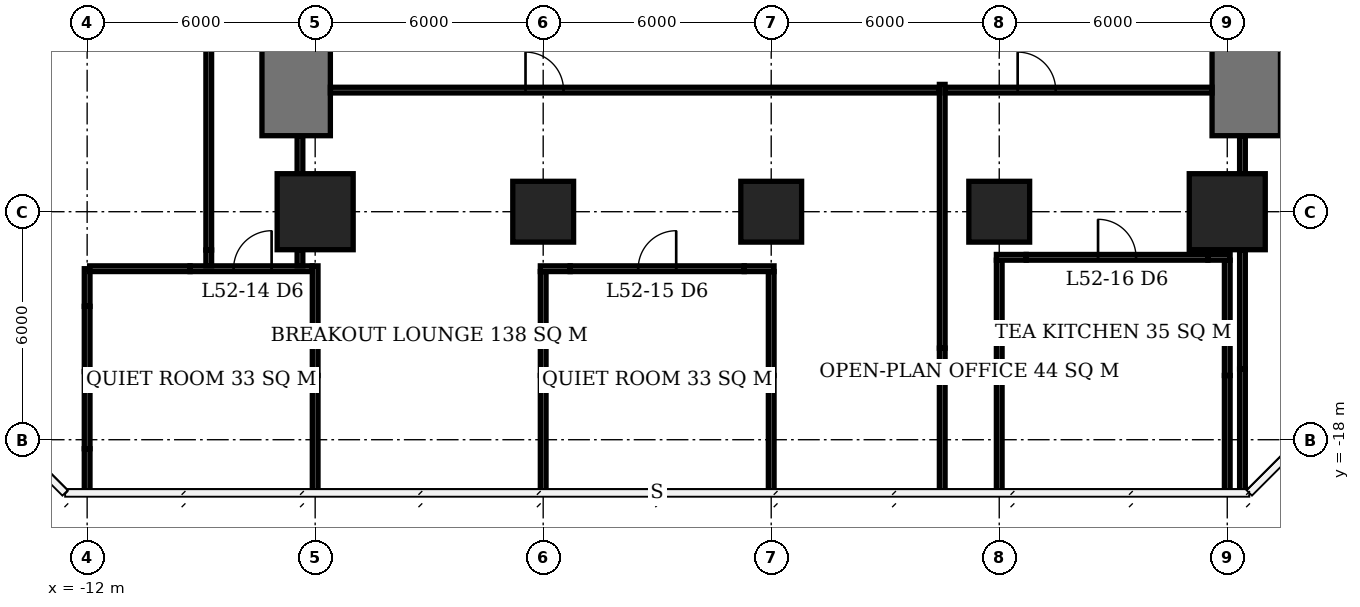
"""IFC4 building model, lengths in metres.
Left out: names, types, materials, properties, quantities, classifications, styles, units other than length and angle.
Written with IfcOpenShell. Run it as: python <this file> out.ifc"""

import sys

from ifc_helpers import new_model, si_unit, direction, frame, frame_2d, origin, origin_2d, place, context, subcontext, project, spatial, rectangle, extrude, element, fill, save


model = new_model("IFC4")
c1 = context("Model", 3, precision=1e-05, world=origin(), true_north=direction((0.0, 1.0)))
c2 = subcontext(c1, "Body", "Model", "MODEL_VIEW")
j1 = project(units=[si_unit("LENGTHUNIT", "METRE"), si_unit("PLANEANGLEUNIT", "RADIAN")], contexts=[c1])
p1 = place(None, origin())
s1 = spatial("IfcSite", under=j1, at=p1, CompositionType="ELEMENT")
p2 = place(p1, origin())
s2 = spatial("IfcBuilding", under=s1, at=p2, CompositionType="ELEMENT")
p3 = place(p2, frame((0.0, 0.0, 212.3)))
s3 = spatial("IfcBuildingStorey", under=s2, at=p3, CompositionType="ELEMENT", Elevation=212.3)
p4 = place(p3, frame((-6.0, -12.0, 0.0), z_axis=(0.0, 0.0, 1.0), x_axis=(1.0, 0.0, 0.0)))
e1 = element("IfcColumn", 1, at=p4, inside=s3, PredefinedType="COLUMN", context=c2, shape_type="SweptSolid", body=[
    extrude(rectangle(XDim=2.0, YDim=2.0, at=origin_2d()), origin(), (0.0, 0.0, 1.0), 3.9),
])
for number, where, z_axis, x_axis in (
    (2, (0.0, -12.0, 0.0), (0.0, 0.0, 1.0), (1.0, 0.0, 0.0)),
    (3, (6.0, -12.0, 0.0), (0.0, 0.0, 1.0), (1.0, 0.0, 0.0)),
    (4, (12.0, -12.0, 0.0), (0.0, 0.0, 1.0), (1.0, 0.0, 0.0)),
):
    element("IfcColumn", number, at=place(p3, frame(where, z_axis=z_axis, x_axis=x_axis)), inside=s3, PredefinedType="COLUMN", context=c2, shape_type="SweptSolid", body=[
        extrude(rectangle(XDim=1.6, YDim=1.6, at=origin_2d()), origin(), (0.0, 0.0, 1.0), 3.9),
    ])
p5 = place(p3, frame((18.0, -12.0, 0.0), z_axis=(0.0, 0.0, 1.0), x_axis=(1.0, 0.0, 0.0)))
e5 = element("IfcColumn", 5, at=p5, inside=s3, PredefinedType="COLUMN", context=c2, shape_type="SweptSolid", body=[
    extrude(rectangle(XDim=2.0, YDim=2.0, at=origin_2d()), origin(), (0.0, 0.0, 1.0), 3.9),
])
for number, where, z_axis, x_axis in (
    (6, (-6.5, -10.0, 0.0), (0.0, 0.0, 1.0), (0.0, 1.0, 0.0)),
    (7, (18.5, -10.0, 0.0), (0.0, 0.0, 1.0), (0.0, 1.0, 0.0)),
):
    element("IfcWall", number, at=place(p3, frame(where, z_axis=z_axis, x_axis=x_axis)), inside=s3, PredefinedType="SHEAR", context=c2, shape_type="SweptSolid", body=[
        extrude(rectangle(XDim=2.4, YDim=1.8, at=frame_2d((1.2, 0.0))), origin(), (0.0, 0.0, 1.0), 3.9),
    ])
p6 = place(p3, frame((-11.935, -13.5, 0.0), z_axis=(0.0, 0.0, 1.0), x_axis=(1.0, 0.0, 0.0)))
e8 = element("IfcWall", 8, at=p6, inside=s3, PredefinedType="PARTITIONING", context=c2, shape_type="SweptSolid", body=[
    extrude(rectangle(XDim=2.643, YDim=0.15, at=frame_2d((1.322, 0.0))), origin(), (0.0, 0.0, 1.0), 3.65),
])
p7 = place(p3, frame((-9.292, -13.5, 0.0), z_axis=(0.0, 0.0, 1.0), x_axis=(1.0, 0.0, 0.0)))
e9 = element("IfcWall", 9, at=p7, inside=s3, PredefinedType="PARTITIONING", context=c2, shape_type="SweptSolid", body=[
    extrude(rectangle(XDim=3.217, YDim=0.15, at=frame_2d((1.608, 0.0))), origin(), (0.0, 0.0, 1.0), 2.65),
])
p8 = place(p7, frame((1.146, 0.0, 0.0)))
e10 = element("IfcOpeningElement", 10, at=p8, cuts=e9, PredefinedType="OPENING", context=c2, shape_type="SweptSolid", body=[
    extrude(rectangle(XDim=1.0, YDim=2.1, at=frame_2d((0.5, 1.05))), frame((0.0, 0.085, 0.0), z_axis=(0.0, -1.0, 0.0), x_axis=(1.0, 0.0, 0.0)), (0.0, 0.0, 1.0), 0.17),
])
p9 = place(p3, frame((-0.075, -13.5, 0.0), z_axis=(0.0, 0.0, 1.0), x_axis=(1.0, 0.0, 0.0)))
e11 = element("IfcWall", 11, at=p9, inside=s3, PredefinedType="PARTITIONING", context=c2, shape_type="SweptSolid", body=[
    extrude(rectangle(XDim=0.785, YDim=0.15, at=frame_2d((0.393, 0.0))), origin(), (0.0, 0.0, 1.0), 2.65),
])
p10 = place(p3, frame((0.71, -13.5, 0.0), z_axis=(0.0, 0.0, 1.0), x_axis=(1.0, 0.0, 0.0)))
e12 = element("IfcWall", 12, at=p10, inside=s3, PredefinedType="PARTITIONING", context=c2, shape_type="SweptSolid", body=[
    extrude(rectangle(XDim=4.58, YDim=0.15, at=frame_2d((2.29, 0.0))), origin(), (0.0, 0.0, 1.0), 3.65),
])
p11 = place(p10, frame((1.79, 0.0, 0.0)))
e13 = element("IfcOpeningElement", 13, at=p11, cuts=e12, PredefinedType="OPENING", context=c2, shape_type="SweptSolid", body=[
    extrude(rectangle(XDim=1.0, YDim=2.1, at=frame_2d((0.5, 1.05))), frame((0.0, 0.085, 0.0), z_axis=(0.0, -1.0, 0.0), x_axis=(1.0, 0.0, 0.0)), (0.0, 0.0, 1.0), 0.17),
])
for number, where, z_axis, x_axis in (
    (14, (5.29, -13.5, 0.0), (0.0, 0.0, 1.0), (1.0, 0.0, 0.0)),
    (15, (11.925, -13.2, 0.0), (0.0, 0.0, 1.0), (1.0, 0.0, 0.0)),
):
    element("IfcWall", number, at=place(p3, frame(where, z_axis=z_axis, x_axis=x_axis)), inside=s3, PredefinedType="PARTITIONING", context=c2, shape_type="SweptSolid", body=[
        extrude(rectangle(XDim=0.785, YDim=0.15, at=frame_2d((0.393, 0.0))), origin(), (0.0, 0.0, 1.0), 2.65),
    ])
p12 = place(p3, frame((12.71, -13.2, 0.0), z_axis=(0.0, 0.0, 1.0), x_axis=(1.0, 0.0, 0.0)))
e16 = element("IfcWall", 16, at=p12, inside=s3, PredefinedType="PARTITIONING", context=c2, shape_type="SweptSolid", body=[
    extrude(rectangle(XDim=4.78, YDim=0.15, at=frame_2d((2.39, 0.0))), origin(), (0.0, 0.0, 1.0), 3.65),
])
p13 = place(p12, frame((1.89, 0.0, 0.0)))
e17 = element("IfcOpeningElement", 17, at=p13, cuts=e16, PredefinedType="OPENING", context=c2, shape_type="SweptSolid", body=[
    extrude(rectangle(XDim=1.0, YDim=2.1, at=frame_2d((0.5, 1.05))), frame((0.0, 0.085, 0.0), z_axis=(0.0, -1.0, 0.0), x_axis=(1.0, 0.0, 0.0)), (0.0, 0.0, 1.0), 0.17),
])
p14 = place(p3, frame((17.49, -13.2, 0.0), z_axis=(0.0, 0.0, 1.0), x_axis=(1.0, 0.0, 0.0)))
e18 = element("IfcWall", 18, at=p14, inside=s3, PredefinedType="PARTITIONING", context=c2, shape_type="SweptSolid", body=[
    extrude(rectangle(XDim=0.585, YDim=0.15, at=frame_2d((0.292, 0.0))), origin(), (0.0, 0.0, 1.0), 2.65),
])
p15 = place(p3, frame((-12.0, -19.4, 0.0), z_axis=(0.0, 0.0, 1.0), x_axis=(0.0, 1.0, 0.0)))
e19 = element("IfcWall", 19, at=p15, inside=s3, PredefinedType="PARTITIONING", context=c2, shape_type="SweptSolid", body=[
    extrude(rectangle(XDim=1.163, YDim=0.15, at=frame_2d((0.582, 0.0))), origin(), (0.0, 0.0, 1.0), 3.65),
])
p16 = place(p3, frame((-12.0, -18.237, 0.0), z_axis=(0.0, 0.0, 1.0), x_axis=(0.0, 1.0, 0.0)))
e20 = element("IfcWall", 20, at=p16, inside=s3, PredefinedType="PARTITIONING", context=c2, shape_type="SweptSolid", body=[
    extrude(rectangle(XDim=2.029, YDim=0.15, at=frame_2d((1.015, 0.0))), origin(), (0.0, 0.0, 1.0), 2.65),
])
p17 = place(p3, frame((-12.0, -16.208, 0.0), z_axis=(0.0, 0.0, 1.0), x_axis=(0.0, 1.0, 0.0)))
e21 = element("IfcWall", 21, at=p17, inside=s3, PredefinedType="PARTITIONING", context=c2, shape_type="SweptSolid", body=[
    extrude(rectangle(XDim=1.718, YDim=0.15, at=frame_2d((0.859, 0.0))), origin(), (0.0, 0.0, 1.0), 3.65),
])
p18 = place(p3, frame((-12.0, -14.49, 0.0), z_axis=(0.0, 0.0, 1.0), x_axis=(0.0, 1.0, 0.0)))
e22 = element("IfcWall", 22, at=p18, inside=s3, PredefinedType="PARTITIONING", context=c2, shape_type="SweptSolid", body=[
    extrude(rectangle(XDim=0.99, YDim=0.15, at=frame_2d((0.495, 0.0))), origin(), (0.0, 0.0, 1.0), 2.65),
])
p19 = place(p3, frame((-6.0, -19.4, 0.0), z_axis=(0.0, 0.0, 1.0), x_axis=(0.0, 1.0, 0.0)))
e23 = element("IfcWall", 23, at=p19, inside=s3, PredefinedType="PARTITIONING", context=c2, shape_type="SweptSolid", body=[
    extrude(rectangle(XDim=3.09, YDim=0.15, at=frame_2d((1.545, 0.0))), origin(), (0.0, 0.0, 1.0), 3.65),
])
p20 = place(p3, frame((-6.0, -16.31, 0.0), z_axis=(0.0, 0.0, 1.0), x_axis=(0.0, 1.0, 0.0)))
e24 = element("IfcWall", 24, at=p20, inside=s3, PredefinedType="PARTITIONING", context=c2, shape_type="SweptSolid", body=[
    extrude(rectangle(XDim=2.885, YDim=0.15, at=frame_2d((1.442, 0.0))), origin(), (0.0, 0.0, 1.0), 2.65),
])
p21 = place(p3, frame((0.0, -19.35, 0.0), z_axis=(0.0, 0.0, 1.0), x_axis=(0.0, 1.0, 0.0)))
e25 = element("IfcWall", 25, at=p21, inside=s3, PredefinedType="PARTITIONING", context=c2, shape_type="SweptSolid", body=[
    extrude(rectangle(XDim=3.04, YDim=0.15, at=frame_2d((1.52, 0.0))), origin(), (0.0, 0.0, 1.0), 3.65),
])
p22 = place(p3, frame((0.0, -16.31, 0.0), z_axis=(0.0, 0.0, 1.0), x_axis=(0.0, 1.0, 0.0)))
e26 = element("IfcWall", 26, at=p22, inside=s3, PredefinedType="PARTITIONING", context=c2, shape_type="SweptSolid", body=[
    extrude(rectangle(XDim=2.735, YDim=0.15, at=frame_2d((1.368, 0.0))), origin(), (0.0, 0.0, 1.0), 2.65),
])
p23 = place(p3, frame((6.0, -19.35, 0.0), z_axis=(0.0, 0.0, 1.0), x_axis=(0.0, 1.0, 0.0)))
e27 = element("IfcWall", 27, at=p23, inside=s3, PredefinedType="PARTITIONING", context=c2, shape_type="SweptSolid", body=[
    extrude(rectangle(XDim=3.04, YDim=0.15, at=frame_2d((1.52, 0.0))), origin(), (0.0, 0.0, 1.0), 3.65),
])
p24 = place(p3, frame((6.0, -16.31, 0.0), z_axis=(0.0, 0.0, 1.0), x_axis=(0.0, 1.0, 0.0)))
e28 = element("IfcWall", 28, at=p24, inside=s3, PredefinedType="PARTITIONING", context=c2, shape_type="SweptSolid", body=[
    extrude(rectangle(XDim=2.735, YDim=0.15, at=frame_2d((1.368, 0.0))), origin(), (0.0, 0.0, 1.0), 2.65),
])
p25 = place(p3, frame((12.0, -19.4, 0.0), z_axis=(0.0, 0.0, 1.0), x_axis=(0.0, 1.0, 0.0)))
e29 = element("IfcWall", 29, at=p25, inside=s3, PredefinedType="PARTITIONING", context=c2, shape_type="SweptSolid", body=[
    extrude(rectangle(XDim=3.09, YDim=0.15, at=frame_2d((1.545, 0.0))), origin(), (0.0, 0.0, 1.0), 3.65),
])
p26 = place(p3, frame((12.0, -16.31, 0.0), z_axis=(0.0, 0.0, 1.0), x_axis=(0.0, 1.0, 0.0)))
e30 = element("IfcWall", 30, at=p26, inside=s3, PredefinedType="PARTITIONING", context=c2, shape_type="SweptSolid", body=[
    extrude(rectangle(XDim=3.035, YDim=0.15, at=frame_2d((1.518, 0.0))), origin(), (0.0, 0.0, 1.0), 2.65),
])
p27 = place(p3, frame((18.0, -19.4, 0.0), z_axis=(0.0, 0.0, 1.0), x_axis=(0.0, 1.0, 0.0)))
e31 = element("IfcWall", 31, at=p27, inside=s3, PredefinedType="PARTITIONING", context=c2, shape_type="SweptSolid", body=[
    extrude(rectangle(XDim=3.09, YDim=0.15, at=frame_2d((1.545, 0.0))), origin(), (0.0, 0.0, 1.0), 3.65),
])
p28 = place(p3, frame((18.0, -16.31, 0.0), z_axis=(0.0, 0.0, 1.0), x_axis=(0.0, 1.0, 0.0)))
e32 = element("IfcWall", 32, at=p28, inside=s3, PredefinedType="PARTITIONING", context=c2, shape_type="SweptSolid", body=[
    extrude(rectangle(XDim=3.035, YDim=0.15, at=frame_2d((1.518, 0.0))), origin(), (0.0, 0.0, 1.0), 2.65),
])
p29 = place(p3, frame((-8.8, -13.425, 0.0), z_axis=(0.0, 0.0, 1.0), x_axis=(0.0, 1.0, 0.0)))
e33 = element("IfcWall", 33, at=p29, inside=s3, PredefinedType="PARTITIONING", context=c2, shape_type="SweptSolid", body=[
    extrude(rectangle(XDim=0.417, YDim=0.15, at=frame_2d((0.208, 0.0))), origin(), (0.0, 0.0, 1.0), 2.65),
])
p30 = place(p3, frame((-8.8, -13.008, 0.0), z_axis=(0.0, 0.0, 1.0), x_axis=(0.0, 1.0, 0.0)))
e34 = element("IfcWall", 34, at=p30, inside=s3, PredefinedType="PARTITIONING", context=c2, shape_type="SweptSolid", body=[
    extrude(rectangle(XDim=20.433, YDim=0.15, at=frame_2d((10.216, 0.0))), origin(), (0.0, 0.0, 1.0), 3.65),
])
p31 = place(p30, frame((6.407, 0.0, 0.0)))
e35 = element("IfcOpeningElement", 35, at=p31, cuts=e34, PredefinedType="OPENING", context=c2, shape_type="SweptSolid", body=[
    extrude(rectangle(XDim=1.0, YDim=2.1, at=frame_2d((0.5, 1.05))), frame((0.0, 0.085, 0.0), z_axis=(0.0, -1.0, 0.0), x_axis=(1.0, 0.0, 0.0)), (0.0, 0.0, 1.0), 0.17),
])
p32 = place(p3, frame((-6.4, -13.425, 0.0), z_axis=(0.0, 0.0, 1.0), x_axis=(0.0, 1.0, 0.0)))
e36 = element("IfcWall", 36, at=p32, inside=s3, PredefinedType="PARTITIONING", context=c2, shape_type="SweptSolid", body=[
    extrude(rectangle(XDim=0.425, YDim=0.15, at=frame_2d((0.212, 0.0))), origin(), (0.0, 0.0, 1.0), 2.65),
])
p33 = place(p3, frame((-6.4, -11.0, 0.0), z_axis=(0.0, 0.0, 1.0), x_axis=(0.0, 1.0, 0.0)))
e37 = element("IfcWall", 37, at=p33, inside=s3, PredefinedType="PARTITIONING", context=c2, shape_type="SweptSolid", body=[
    extrude(rectangle(XDim=1.0, YDim=0.15, at=frame_2d((0.5, 0.0))), origin(), (0.0, 0.0, 1.0), 3.65),
])
p34 = place(p3, frame((-5.6, -8.8, 0.0), z_axis=(0.0, 0.0, 1.0), x_axis=(1.0, 0.0, 0.0)))
e38 = element("IfcWall", 38, at=p34, inside=s3, PredefinedType="PARTITIONING", context=c2, shape_type="SweptSolid", body=[
    extrude(rectangle(XDim=16.025, YDim=0.15, at=frame_2d((8.013, 0.0))), origin(), (0.0, 0.0, 1.0), 3.65),
])
p35 = place(p34, frame((5.135, 0.0, 0.0)))
e39 = element("IfcOpeningElement", 39, at=p35, cuts=e38, PredefinedType="OPENING", context=c2, shape_type="SweptSolid", body=[
    extrude(rectangle(XDim=1.0, YDim=2.1, at=frame_2d((0.5, 1.05))), frame((0.0, 0.085, 0.0), z_axis=(0.0, -1.0, 0.0), x_axis=(1.0, 0.0, 0.0)), (0.0, 0.0, 1.0), 0.17),
])
p36 = place(p3, frame((10.5, -19.4, 0.0), z_axis=(0.0, 0.0, 1.0), x_axis=(0.0, 1.0, 0.0)))
e40 = element("IfcWall", 40, at=p36, inside=s3, PredefinedType="PARTITIONING", context=c2, shape_type="SweptSolid", body=[
    extrude(rectangle(XDim=3.09, YDim=0.15, at=frame_2d((1.545, 0.0))), origin(), (0.0, 0.0, 1.0), 3.65),
])
p37 = place(p3, frame((10.5, -16.31, 0.0), z_axis=(0.0, 0.0, 1.0), x_axis=(0.0, 1.0, 0.0)))
e41 = element("IfcWall", 41, at=p37, inside=s3, PredefinedType="PARTITIONING", context=c2, shape_type="SweptSolid", body=[
    extrude(rectangle(XDim=0.72, YDim=0.15, at=frame_2d((0.36, 0.0))), origin(), (0.0, 0.0, 1.0), 2.65),
])
p38 = place(p3, frame((10.5, -15.59, 0.0), z_axis=(0.0, 0.0, 1.0), x_axis=(0.0, 1.0, 0.0)))
e42 = element("IfcWall", 42, at=p38, inside=s3, PredefinedType="PARTITIONING", context=c2, shape_type="SweptSolid", body=[
    extrude(rectangle(XDim=6.94, YDim=0.15, at=frame_2d((3.47, 0.0))), origin(), (0.0, 0.0, 1.0), 3.65),
])
p39 = place(p3, frame((10.575, -8.8, 0.0), z_axis=(0.0, 0.0, 1.0), x_axis=(1.0, 0.0, 0.0)))
e43 = element("IfcWall", 43, at=p39, inside=s3, PredefinedType="PARTITIONING", context=c2, shape_type="SweptSolid", body=[
    extrude(rectangle(XDim=7.025, YDim=0.15, at=frame_2d((3.513, 0.0))), origin(), (0.0, 0.0, 1.0), 3.65),
])
p40 = place(p39, frame((1.91, 0.0, 0.0)))
e44 = element("IfcOpeningElement", 44, at=p40, cuts=e43, PredefinedType="OPENING", context=c2, shape_type="SweptSolid", body=[
    extrude(rectangle(XDim=1.0, YDim=2.1, at=frame_2d((0.5, 1.05))), frame((0.0, 0.085, 0.0), z_axis=(0.0, -1.0, 0.0), x_axis=(1.0, 0.0, 0.0)), (0.0, 0.0, 1.0), 0.17),
])
p41 = place(p3, frame((18.4, -19.4, 0.0), z_axis=(0.0, 0.0, 1.0), x_axis=(0.0, 1.0, 0.0)))
e45 = element("IfcWall", 45, at=p41, inside=s3, PredefinedType="PARTITIONING", context=c2, shape_type="SweptSolid", body=[
    extrude(rectangle(XDim=3.26, YDim=0.15, at=frame_2d((1.63, 0.0))), origin(), (0.0, 0.0, 1.0), 3.65),
])
p42 = place(p3, frame((18.4, -16.14, 0.0), z_axis=(0.0, 0.0, 1.0), x_axis=(0.0, 1.0, 0.0)))
e46 = element("IfcWall", 46, at=p42, inside=s3, PredefinedType="PARTITIONING", context=c2, shape_type="SweptSolid", body=[
    extrude(rectangle(XDim=3.14, YDim=0.15, at=frame_2d((1.57, 0.0))), origin(), (0.0, 0.0, 1.0), 2.65),
])
p43 = place(p3, frame((18.4, -11.0, 0.0), z_axis=(0.0, 0.0, 1.0), x_axis=(0.0, 1.0, 0.0)))
e47 = element("IfcWall", 47, at=p43, inside=s3, PredefinedType="PARTITIONING", context=c2, shape_type="SweptSolid", body=[
    extrude(rectangle(XDim=1.0, YDim=0.15, at=frame_2d((0.5, 0.0))), origin(), (0.0, 0.0, 1.0), 3.65),
])
p44 = place(p8, origin())
e48 = element("IfcDoor", 48, at=p44, inside=s3, OperationType="SINGLE_SWING_RIGHT", PredefinedType="DOOR", context=c2, shape_type="SweptSolid", body=[
    extrude(rectangle(XDim=1.0, YDim=2.1, at=frame_2d((0.5, 1.05))), frame((0.0, 0.025, 0.0), z_axis=(0.0, -1.0, 0.0), x_axis=(1.0, 0.0, 0.0)), (0.0, 0.0, 1.0), 0.05),
])
fill(e10, e48)
p45 = place(p11, origin())
e49 = element("IfcDoor", 49, at=p45, inside=s3, OperationType="SINGLE_SWING_RIGHT", PredefinedType="DOOR", context=c2, shape_type="SweptSolid", body=[
    extrude(rectangle(XDim=1.0, YDim=2.1, at=frame_2d((0.5, 1.05))), frame((0.0, 0.025, 0.0), z_axis=(0.0, -1.0, 0.0), x_axis=(1.0, 0.0, 0.0)), (0.0, 0.0, 1.0), 0.05),
])
fill(e13, e49)
p46 = place(p13, origin())
e50 = element("IfcDoor", 50, at=p46, inside=s3, OperationType="SINGLE_SWING_LEFT", PredefinedType="DOOR", context=c2, shape_type="SweptSolid", body=[
    extrude(rectangle(XDim=1.0, YDim=2.1, at=frame_2d((0.5, 1.05))), frame((0.0, 0.025, 0.0), z_axis=(0.0, -1.0, 0.0), x_axis=(1.0, 0.0, 0.0)), (0.0, 0.0, 1.0), 0.05),
])
fill(e17, e50)
p47 = place(p35, origin())
e51 = element("IfcDoor", 51, at=p47, inside=s3, OperationType="SINGLE_SWING_LEFT", PredefinedType="DOOR", context=c2, shape_type="SweptSolid", body=[
    extrude(rectangle(XDim=1.0, YDim=2.1, at=frame_2d((0.5, 1.05))), frame((0.0, 0.025, 0.0), z_axis=(0.0, -1.0, 0.0), x_axis=(1.0, 0.0, 0.0)), (0.0, 0.0, 1.0), 0.05),
])
fill(e39, e51)
p48 = place(p40, origin())
e52 = element("IfcDoor", 52, at=p48, inside=s3, OperationType="SINGLE_SWING_LEFT", PredefinedType="DOOR", context=c2, shape_type="SweptSolid", body=[
    extrude(rectangle(XDim=1.0, YDim=2.1, at=frame_2d((0.5, 1.05))), frame((0.0, 0.025, 0.0), z_axis=(0.0, -1.0, 0.0), x_axis=(1.0, 0.0, 0.0)), (0.0, 0.0, 1.0), 0.05),
])
fill(e44, e52)
save(model, sys.argv[1])
